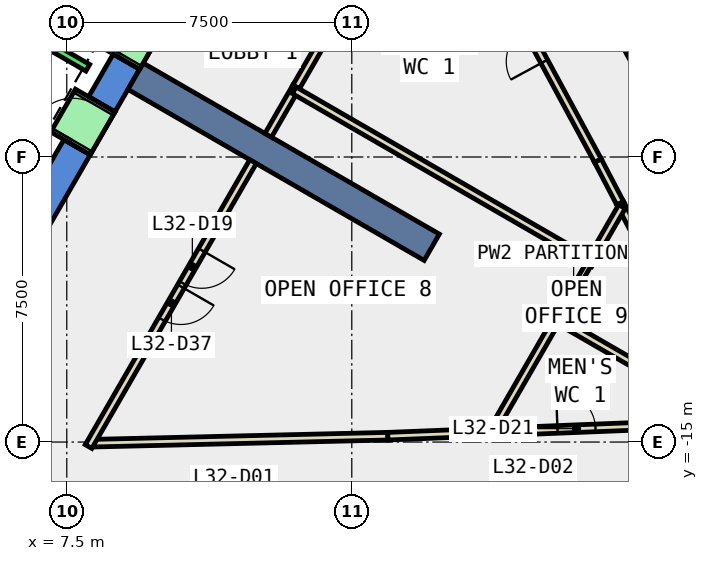
"""IFC4 building model, lengths in metres.
Left out: names, types, materials, properties, quantities, classifications, styles, units other than length and angle.
Written with IfcOpenShell. Run it as: python <this file> out.ifc"""

import sys

from ifc_helpers import new_model, si_unit, direction, frame, frame_2d, origin, place, context, subcontext, project, spatial, polyline, rectangle, outline, extrude, element, fill, save


model = new_model("IFC4")
c1 = context("Model", 3, precision=1e-05, world=origin(), true_north=direction((0.0, 1.0)))
c2 = subcontext(c1, "Body", "Model", "MODEL_VIEW")
j1 = project(units=[si_unit("LENGTHUNIT", "METRE"), si_unit("PLANEANGLEUNIT", "RADIAN")], contexts=[c1])
p1 = place(None, origin())
s1 = spatial("IfcSite", under=j1, at=p1, CompositionType="ELEMENT")
p2 = place(p1, origin())
s2 = spatial("IfcBuilding", under=s1, at=p2, CompositionType="ELEMENT")
p3 = place(p2, frame((0.0, 0.0, 146.6)))
s3 = spatial("IfcBuildingStorey", under=s2, at=p3, CompositionType="ELEMENT", Elevation=146.6)
p4 = place(p3, frame((0.0, 0.0, -0.4)))
e1 = element("IfcWall", 1, at=p4, inside=s3, PredefinedType="SHEAR", context=c2, shape_type="SweptSolid", body=[
    extrude(outline(polyline([(8.117, -7.44), (7.424, -7.04), (6.466, -8.7), (6.928, -9.5), (8.117, -7.44)])), origin(), (0.0, 0.0, 1.0), 4.2),
])
p5 = place(p3, frame((0.0, 0.0, -0.4)))
e2 = element("IfcWall", 2, at=p5, inside=s3, PredefinedType="SHEAR", context=c2, shape_type="SweptSolid", body=[
    extrude(outline(polyline([(9.417, -5.189), (8.724, -4.789), (8.075, -5.914), (8.767, -6.314), (9.417, -5.189)])), origin(), (0.0, 0.0, 1.0), 4.2),
])
p6 = place(p3, frame((0.0, 0.0, 3.6)))
e3 = element("IfcWall", 3, at=p6, inside=s3, PredefinedType="SHEAR", context=c2, shape_type="SweptSolid", body=[
    extrude(outline(polyline([(8.767, -6.314), (8.075, -5.914), (7.424, -7.04), (8.117, -7.44), (8.767, -6.314)])), origin(), (0.0, 0.0, 1.0), 0.2),
])
p7 = place(p3, frame((0.0, 0.0, 3.6)))
e4 = element("IfcWall", 4, at=p7, inside=s3, PredefinedType="SHEAR", context=c2, shape_type="SweptSolid", body=[
    extrude(outline(polyline([(10.067, -4.063), (9.374, -3.663), (8.724, -4.789), (9.417, -5.189), (10.067, -4.063)])), origin(), (0.0, 0.0, 1.0), 0.2),
])
p8 = place(p3, frame((9.31, -5.375, -0.4), z_axis=(0.0, 0.0, 1.0), x_axis=(0.866017533419, -0.500013631625, 0.0)))
e5 = element("IfcWall", 5, at=p8, inside=s3, PredefinedType="SHEAR", context=c2, shape_type="SweptSolid", body=[
    extrude(rectangle(XDim=9.0, YDim=0.8, at=frame_2d((4.5, 0.0))), origin(), (0.0, 0.0, 1.0), 4.2),
])
p9 = place(p3, frame((8.223, -15.029, 0.0), z_axis=(0.0, 0.0, 1.0), x_axis=(0.99971920994, 0.023696018186, 0.0)))
e6 = element("IfcWall", 6, at=p9, inside=s3, PredefinedType="PARTITIONING", context=c2, shape_type="SweptSolid", body=[
    extrude(rectangle(XDim=7.727, YDim=0.2, at=frame_2d((3.864, 0.0))), origin(), (0.0, 0.0, 1.0), 3.8),
])
p10 = place(p3, frame((15.948, -14.846, 0.0), z_axis=(0.0, 0.0, 1.0), x_axis=(0.999208477774, 0.039779617206, 0.0)))
e7 = element("IfcWall", 7, at=p10, inside=s3, PredefinedType="PARTITIONING", context=c2, shape_type="SweptSolid", body=[
    extrude(rectangle(XDim=2.639, YDim=0.2, at=frame_2d((1.32, 0.0))), origin(), (0.0, 0.0, 1.0), 3.8),
])
p11 = place(p3, frame((22.063, -8.717, 0.0), z_axis=(0.0, 0.0, 1.0), x_axis=(-0.463776683525, 0.885952136302, 0.0)))
e8 = element("IfcWall", 8, at=p11, inside=s3, PredefinedType="PARTITIONING", context=c2, shape_type="SweptSolid", body=[
    extrude(rectangle(XDim=1.268, YDim=0.2, at=frame_2d((0.634, 0.0))), origin(), (0.0, 0.0, 1.0), 3.8),
])
p12 = place(p3, frame((21.475, -7.594, 0.0), z_axis=(0.0, 0.0, 1.0), x_axis=(-0.475918691018, 0.879489283357, 0.0)))
e9 = element("IfcWall", 9, at=p12, inside=s3, PredefinedType="PARTITIONING", context=c2, shape_type="SweptSolid", body=[
    extrude(rectangle(XDim=6.928, YDim=0.2, at=frame_2d((3.464, 0.0))), origin(), (0.0, 0.0, 1.0), 3.8),
])
p13 = place(p12, frame((2.964, 0.0, 0.0)))
e10 = element("IfcOpeningElement", 10, at=p13, cuts=e9, PredefinedType="OPENING", context=c2, shape_type="SweptSolid", body=[
    extrude(rectangle(XDim=1.0, YDim=2.1, at=frame_2d((0.5, 1.05))), frame((0.0, 0.11, 0.0), z_axis=(0.0, -1.0, 0.0), x_axis=(1.0, 0.0, 0.0)), (0.0, 0.0, 1.0), 0.22),
])
p14 = place(p3, frame((18.585, -14.741, 0.0), z_axis=(0.0, 0.0, 1.0), x_axis=(0.99920304932, 0.039915739113, 0.0)))
e11 = element("IfcWall", 11, at=p14, inside=s3, PredefinedType="PARTITIONING", context=c2, shape_type="SweptSolid", body=[
    extrude(rectangle(XDim=4.661, YDim=0.2, at=frame_2d((2.33, 0.0))), origin(), (0.0, 0.0, 1.0), 3.8),
])
p15 = place(p14, frame((1.83, 0.0, 0.0)))
e12 = element("IfcOpeningElement", 12, at=p15, cuts=e11, PredefinedType="OPENING", context=c2, shape_type="SweptSolid", body=[
    extrude(rectangle(XDim=1.0, YDim=2.1, at=frame_2d((0.5, 1.05))), frame((0.0, 0.11, 0.0), z_axis=(0.0, -1.0, 0.0), x_axis=(1.0, 0.0, 0.0)), (0.0, 0.0, 1.0), 0.22),
])
p16 = place(p3, frame((24.224, -12.845, 0.0), z_axis=(0.0, 0.0, 1.0), x_axis=(-0.463819025987, 0.885929969655, 0.0)))
e13 = element("IfcWall", 13, at=p16, inside=s3, PredefinedType="PARTITIONING", context=c2, shape_type="SweptSolid", body=[
    extrude(rectangle(XDim=4.659, YDim=0.2, at=frame_2d((2.33, 0.0))), origin(), (0.0, 0.0, 1.0), 3.8),
])
p17 = place(p16, frame((1.83, 0.0, 0.0)))
e14 = element("IfcOpeningElement", 14, at=p17, cuts=e13, PredefinedType="OPENING", context=c2, shape_type="SweptSolid", body=[
    extrude(rectangle(XDim=1.0, YDim=2.1, at=frame_2d((0.5, 1.05))), frame((0.0, 0.11, 0.0), z_axis=(0.0, -1.0, 0.0), x_axis=(1.0, 0.0, 0.0)), (0.0, 0.0, 1.0), 0.22),
])
p18 = place(p3, frame((20.018, -0.489, 0.0), z_axis=(0.0, 0.0, 1.0), x_axis=(0.476025981828, -0.87943121654, 0.0)))
e15 = element("IfcWall", 15, at=p18, inside=s3, PredefinedType="PARTITIONING", context=c2, shape_type="SweptSolid", body=[
    extrude(rectangle(XDim=6.882, YDim=0.2, at=frame_2d((3.441, 0.0))), origin(), (0.0, 0.0, 1.0), 3.8),
])
p19 = place(p18, frame((3.016, 0.0, 0.0)))
e16 = element("IfcOpeningElement", 16, at=p19, cuts=e15, PredefinedType="OPENING", context=c2, shape_type="SweptSolid", body=[
    extrude(rectangle(XDim=1.0, YDim=2.1, at=frame_2d((0.5, 1.05))), frame((0.0, 0.11, 0.0), z_axis=(0.0, -1.0, 0.0), x_axis=(1.0, 0.0, 0.0)), (0.0, 0.0, 1.0), 0.22),
])
p20 = place(p3, frame((13.535, -5.657, 0.0), z_axis=(0.0, 0.0, 1.0), x_axis=(-0.499751238113, -0.866168978898, 0.0)))
e17 = element("IfcWall", 17, at=p20, inside=s3, PredefinedType="PARTITIONING", context=c2, shape_type="SweptSolid", body=[
    extrude(rectangle(XDim=1.469, YDim=0.2, at=frame_2d((0.734, 0.0))), origin(), (0.0, 0.0, 1.0), 3.8),
])
p21 = place(p3, frame((17.124, 0.56, 0.0), z_axis=(0.0, 0.0, 1.0), x_axis=(-0.49996876383, -0.866043437245, 0.0)))
e18 = element("IfcWall", 18, at=p21, inside=s3, PredefinedType="PARTITIONING", context=c2, shape_type="SweptSolid", body=[
    extrude(rectangle(XDim=7.179, YDim=0.2, at=frame_2d((3.589, 0.0))), origin(), (0.0, 0.0, 1.0), 3.8),
])
p22 = place(p3, frame((13.485, -5.744, 0.0), z_axis=(0.0, 0.0, 1.0), x_axis=(0.865950545648, -0.500129635687, 0.0)))
e19 = element("IfcWall", 19, at=p22, inside=s3, PredefinedType="PARTITIONING", context=c2, shape_type="SweptSolid", body=[
    extrude(rectangle(XDim=9.1, YDim=0.2, at=frame_2d((4.55, 0.0))), origin(), (0.0, 0.0, 1.0), 3.8),
])
p23 = place(p3, frame((20.347, -11.858, 0.0), z_axis=(0.0, 0.0, 1.0), x_axis=(-0.49990681678, -0.866079196458, 0.0)))
e20 = element("IfcWall", 20, at=p23, inside=s3, PredefinedType="PARTITIONING", context=c2, shape_type="SweptSolid", body=[
    extrude(rectangle(XDim=3.324, YDim=0.2, at=frame_2d((1.662, 0.0))), origin(), (0.0, 0.0, 1.0), 3.8),
])
p24 = place(p3, frame((21.228, -10.331, 0.0), z_axis=(0.0, 0.0, 1.0), x_axis=(-0.499920861661, -0.866071089505, 0.0)))
e21 = element("IfcWall", 21, at=p24, inside=s3, PredefinedType="PARTITIONING", context=c2, shape_type="SweptSolid", body=[
    extrude(rectangle(XDim=1.562, YDim=0.15, at=frame_2d((0.781, 0.0))), origin(), (0.0, 0.0, 1.0), 3.8),
])
p25 = place(p3, frame((22.109, -8.805, 0.0), z_axis=(0.0, 0.0, 1.0), x_axis=(-0.499920861661, -0.866071089505, 0.0)))
e22 = element("IfcWall", 22, at=p25, inside=s3, PredefinedType="PARTITIONING", context=c2, shape_type="SweptSolid", body=[
    extrude(rectangle(XDim=1.562, YDim=0.2, at=frame_2d((0.781, 0.0))), origin(), (0.0, 0.0, 1.0), 3.8),
])
p26 = place(p3, frame((20.31, -11.721, 0.0), z_axis=(0.0, 0.0, 1.0), x_axis=(0.86603399059, -0.499985126921, 0.0)))
e23 = element("IfcWall", 23, at=p26, inside=s3, PredefinedType="PARTITIONING", context=c2, shape_type="SweptSolid", body=[
    extrude(rectangle(XDim=4.854, YDim=0.2, at=frame_2d((2.427, 0.0))), origin(), (0.0, 0.0, 1.0), 3.8),
])
p27 = place(p3, frame((12.401, -7.621, 0.0), z_axis=(0.0, 0.0, 1.0), x_axis=(-0.499964151829, -0.866046099747, 0.0)))
e24 = element("IfcWall", 24, at=p27, inside=s3, PredefinedType="PARTITIONING", context=c2, shape_type="SweptSolid", body=[
    extrude(rectangle(XDim=8.656, YDim=0.2, at=frame_2d((4.328, 0.0))), origin(), (0.0, 0.0, 1.0), 3.8),
])
p28 = place(p27, frame((2.694, 0.0, 0.0)))
e25 = element("IfcOpeningElement", 25, at=p28, cuts=e24, PredefinedType="OPENING", context=c2, shape_type="SweptSolid", body=[
    extrude(rectangle(XDim=1.0, YDim=2.1, at=frame_2d((0.5, 1.05))), frame((0.0, 0.11, 0.0), z_axis=(0.0, -1.0, 0.0), x_axis=(1.0, 0.0, 0.0)), (0.0, 0.0, 1.0), 0.22),
])
p29 = place(p27, frame((3.794, 0.0, 0.0)))
e26 = element("IfcOpeningElement", 26, at=p29, cuts=e24, PredefinedType="OPENING", context=c2, shape_type="SweptSolid", body=[
    extrude(rectangle(XDim=1.0, YDim=2.1, at=frame_2d((0.5, 1.05))), frame((0.0, 0.11, 0.0), z_axis=(0.0, -1.0, 0.0), x_axis=(1.0, 0.0, 0.0)), (0.0, 0.0, 1.0), 0.22),
])
p30 = place(p3, frame((4.451, -6.19, 0.0), z_axis=(0.0, 0.0, 1.0), x_axis=(0.50000090737, 0.866024879913, 0.0)))
e27 = element("IfcWall", 27, at=p30, inside=s3, PredefinedType="STANDARD", context=c2, shape_type="SweptSolid", body=[
    extrude(rectangle(XDim=10.6, YDim=0.2, at=frame_2d((5.3, 0.0))), origin(), (0.0, 0.0, 1.0), 3.8),
])
p31 = place(p3, frame((5.888, -3.902, 0.0), z_axis=(0.0, 0.0, 1.0), x_axis=(0.866022959057, -0.500004234368, 0.0)))
e28 = element("IfcWall", 28, at=p31, inside=s3, PredefinedType="STANDARD", context=c2, shape_type="SweptSolid", body=[
    extrude(rectangle(XDim=2.5, YDim=0.2, at=frame_2d((1.25, 0.0))), origin(), (0.0, 0.0, 1.0), 3.8),
])
p32 = place(p3, frame((7.598, -7.14, 0.0), z_axis=(0.0, 0.0, 1.0), x_axis=(0.500362116554, 0.865816234728, 0.0)))
e29 = element("IfcWall", 29, at=p32, inside=s3, PredefinedType="STANDARD", context=c2, shape_type="SweptSolid", body=[
    extrude(rectangle(XDim=1.299, YDim=1.2, at=frame_2d((0.65, 0.0))), origin(), (0.0, 0.0, 1.0), 2.4),
])
p33 = place(p32, frame((0.1, 0.0, 0.0)))
e30 = element("IfcOpeningElement", 30, at=p33, cuts=e29, PredefinedType="OPENING", context=c2, shape_type="SweptSolid", body=[
    extrude(rectangle(XDim=1.1, YDim=2.3, at=frame_2d((0.55, 1.15))), frame((0.0, 0.61, 0.0), z_axis=(0.0, -1.0, 0.0), x_axis=(1.0, 0.0, 0.0)), (0.0, 0.0, 1.0), 1.22),
])
p34 = place(p3, frame((8.898, -4.889, 0.0), z_axis=(0.0, 0.0, 1.0), x_axis=(0.500036693733, 0.866004217611, 0.0)))
e31 = element("IfcWall", 31, at=p34, inside=s3, PredefinedType="STANDARD", context=c2, shape_type="SweptSolid", body=[
    extrude(rectangle(XDim=1.3, YDim=1.2, at=frame_2d((0.65, 0.0))), origin(), (0.0, 0.0, 1.0), 2.4),
])
p35 = place(p34, frame((0.1, 0.0, 0.0)))
e32 = element("IfcOpeningElement", 32, at=p35, cuts=e31, PredefinedType="OPENING", context=c2, shape_type="SweptSolid", body=[
    extrude(rectangle(XDim=1.1, YDim=2.3, at=frame_2d((0.55, 1.15))), frame((0.0, 0.61, 0.0), z_axis=(0.0, -1.0, 0.0), x_axis=(1.0, 0.0, 0.0)), (0.0, 0.0, 1.0), 1.22),
])
p36 = place(p28, origin())
e33 = element("IfcDoor", 33, at=p36, inside=s3, OperationType="SINGLE_SWING_LEFT", PredefinedType="DOOR", context=c2, shape_type="SweptSolid", body=[
    extrude(rectangle(XDim=1.0, YDim=2.1, at=frame_2d((0.5, 1.05))), frame((0.0, 0.025, 0.0), z_axis=(0.0, -1.0, 0.0), x_axis=(1.0, 0.0, 0.0)), (0.0, 0.0, 1.0), 0.05),
])
fill(e25, e33)
p37 = place(p13, origin())
e34 = element("IfcDoor", 34, at=p37, inside=s3, OperationType="SINGLE_SWING_LEFT", PredefinedType="DOOR", context=c2, shape_type="SweptSolid", body=[
    extrude(rectangle(XDim=1.0, YDim=2.1, at=frame_2d((0.5, 1.05))), frame((0.0, 0.025, 0.0), z_axis=(0.0, -1.0, 0.0), x_axis=(1.0, 0.0, 0.0)), (0.0, 0.0, 1.0), 0.05),
])
fill(e10, e34)
p38 = place(p15, origin())
e35 = element("IfcDoor", 35, at=p38, inside=s3, OperationType="SINGLE_SWING_LEFT", PredefinedType="DOOR", context=c2, shape_type="SweptSolid", body=[
    extrude(rectangle(XDim=1.0, YDim=2.1, at=frame_2d((0.5, 1.05))), frame((0.0, 0.025, 0.0), z_axis=(0.0, -1.0, 0.0), x_axis=(1.0, 0.0, 0.0)), (0.0, 0.0, 1.0), 0.05),
])
fill(e12, e35)
p39 = place(p29, origin())
e36 = element("IfcDoor", 36, at=p39, inside=s3, OperationType="SINGLE_SWING_RIGHT", PredefinedType="DOOR", context=c2, shape_type="SweptSolid", body=[
    extrude(rectangle(XDim=1.0, YDim=2.1, at=frame_2d((0.5, 1.05))), frame((0.0, 0.025, 0.0), z_axis=(0.0, -1.0, 0.0), x_axis=(1.0, 0.0, 0.0)), (0.0, 0.0, 1.0), 0.05),
])
fill(e26, e36)
p40 = place(p33, origin())
e37 = element("IfcDoor", 37, at=p40, inside=s3, OperationType="SLIDING_TO_LEFT", PredefinedType="DOOR", context=c2, shape_type="SweptSolid", body=[
    extrude(rectangle(XDim=1.1, YDim=2.3, at=frame_2d((0.55, 1.15))), frame((0.0, 0.025, 0.0), z_axis=(0.0, -1.0, 0.0), x_axis=(1.0, 0.0, 0.0)), (0.0, 0.0, 1.0), 0.05),
])
fill(e30, e37)
p41 = place(p35, origin())
e38 = element("IfcDoor", 38, at=p41, inside=s3, OperationType="SLIDING_TO_LEFT", PredefinedType="DOOR", context=c2, shape_type="SweptSolid", body=[
    extrude(rectangle(XDim=1.1, YDim=2.3, at=frame_2d((0.55, 1.15))), frame((0.0, 0.025, 0.0), z_axis=(0.0, -1.0, 0.0), x_axis=(1.0, 0.0, 0.0)), (0.0, 0.0, 1.0), 0.05),
])
fill(e32, e38)
save(model, sys.argv[1])
